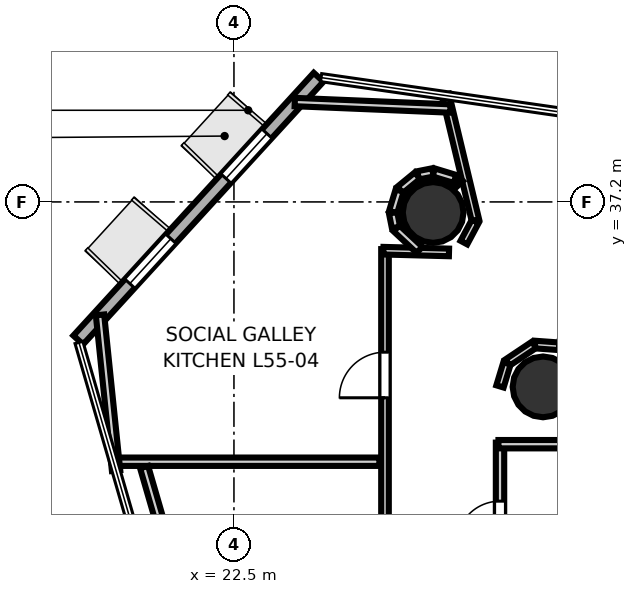
"""IFC4 building model, lengths in metres.
Left out: names, types, materials, properties, quantities, classifications, styles, units other than length and angle.
Written with IfcOpenShell. Run it as: python <this file> out.ifc"""

import sys

from ifc_helpers import new_model, si_unit, direction, frame, frame_2d, origin, origin_2d, place, context, subcontext, project, spatial, rectangle, hollow_circle, extrude, element, fill, save


model = new_model("IFC4")
c1 = context("Model", 3, precision=1e-05, world=origin(), true_north=direction((0.0, 1.0)))
c2 = subcontext(c1, "Body", "Model", "MODEL_VIEW")
j1 = project(units=[si_unit("LENGTHUNIT", "METRE"), si_unit("PLANEANGLEUNIT", "RADIAN")], contexts=[c1])
p1 = place(None, origin())
s1 = spatial("IfcSite", under=j1, at=p1, CompositionType="ELEMENT")
p2 = place(p1, origin())
s2 = spatial("IfcBuilding", under=s1, at=p2, CompositionType="ELEMENT")
p3 = place(p2, frame((0.0, 0.0, 215.1)))
s3 = spatial("IfcBuildingStorey", under=s2, at=p3, CompositionType="ELEMENT", Elevation=215.1)
for number, where, z_axis, x_axis in (
    (1, (28.6, 33.55, 0.0), (0.0, 0.0, 1.0), (1.0, 0.0, 0.0)),
    (2, (26.431, 36.992, 0.0), (0.0, 0.0, 1.0), (1.0, 0.0, 0.0)),
):
    element("IfcColumn", number, at=place(p3, frame(where, z_axis=z_axis, x_axis=x_axis)), inside=s3, PredefinedType="COLUMN", context=c2, shape_type="SweptSolid", body=[
        extrude(hollow_circle(Radius=0.6, WallThickness=0.03, at=origin_2d()), origin(), (0.0, 0.0, 1.0), 3.7),
    ])
p4 = place(p3, frame((24.17, 39.66, 0.0), z_axis=(0.0, 0.0, 1.0), x_axis=(-0.674986503916, -0.73783007497, 0.0)))
e3 = element("IfcWall", 3, at=p4, inside=s3, PredefinedType="SOLIDWALL", context=c2, shape_type="SweptSolid", body=[
    extrude(rectangle(XDim=7.028, YDim=0.26, at=frame_2d((3.514, 0.0))), origin(), (0.0, 0.0, 1.0), 3.52),
])
p5 = place(p4, frame((1.508, 0.0, 0.9)))
e4 = element("IfcOpeningElement", 4, at=p5, cuts=e3, PredefinedType="OPENING", context=c2, shape_type="SweptSolid", body=[
    extrude(rectangle(XDim=1.2, YDim=2.0, at=frame_2d((0.6, 1.0))), frame((0.0, 0.14, 0.0), z_axis=(0.0, -1.0, 0.0), x_axis=(1.0, 0.0, 0.0)), (0.0, 0.0, 1.0), 0.28),
])
p6 = place(p4, frame((4.32, 0.0, 0.9)))
e5 = element("IfcOpeningElement", 5, at=p6, cuts=e3, PredefinedType="OPENING", context=c2, shape_type="SweptSolid", body=[
    extrude(rectangle(XDim=1.2, YDim=2.0, at=frame_2d((0.6, 1.0))), frame((0.0, 0.14, 0.0), z_axis=(0.0, -1.0, 0.0), x_axis=(1.0, 0.0, 0.0)), (0.0, 0.0, 1.0), 0.28),
])
p7 = place(p3, frame((27.751, 29.28, 0.0), z_axis=(0.0, 0.0, 1.0), x_axis=(0.0, 1.0, 0.0)))
e6 = element("IfcWall", 6, at=p7, inside=s3, PredefinedType="PLUMBINGWALL", context=c2, shape_type="SweptSolid", body=[
    extrude(rectangle(XDim=3.17, YDim=0.165, at=frame_2d((1.585, 0.0))), origin(), (0.0, 0.0, 1.0), 2.84),
])
p8 = place(p7, frame((1.155, 0.0, 0.0)))
e7 = element("IfcOpeningElement", 7, at=p8, cuts=e6, PredefinedType="OPENING", context=c2, shape_type="SweptSolid", body=[
    extrude(rectangle(XDim=0.86, YDim=2.05, at=frame_2d((0.43, 1.025))), frame((0.0, 0.093, 0.0), z_axis=(0.0, -1.0, 0.0), x_axis=(1.0, 0.0, 0.0)), (0.0, 0.0, 1.0), 0.185),
])
p9 = place(p3, frame((27.72, 32.419, 0.0), z_axis=(0.0, 0.0, 1.0), x_axis=(1.0, 0.0, 0.0)))
e8 = element("IfcWall", 8, at=p9, inside=s3, PredefinedType="PLUMBINGWALL", context=c2, shape_type="SweptSolid", body=[
    extrude(rectangle(XDim=1.5, YDim=0.165, at=frame_2d((0.75, 0.0))), origin(), (0.0, 0.0, 1.0), 2.84),
])
p10 = place(p3, frame((27.265, 36.839, 0.0), z_axis=(0.0, 0.0, 1.0), x_axis=(-0.232746459293, 0.972537446933, 0.0)))
e9 = element("IfcWall", 9, at=p10, inside=s3, PredefinedType="PARTITIONING", context=c2, shape_type="SweptSolid", body=[
    extrude(rectangle(XDim=2.55, YDim=0.15, at=frame_2d((1.275, 0.0))), origin(), (0.0, 0.0, 1.0), 2.84),
])
p11 = place(p3, frame((29.64, 34.299, 0.0), z_axis=(0.0, 0.0, 1.0), x_axis=(-0.997392224386, 0.072171675429, 0.0)))
e10 = element("IfcWall", 10, at=p11, inside=s3, PredefinedType="PARTITIONING", context=c2, shape_type="SweptSolid", body=[
    extrude(rectangle(XDim=1.201, YDim=0.15, at=frame_2d((0.601, 0.0))), origin(), (0.0, 0.0, 1.0), 2.84),
])
p12 = place(p3, frame((28.423, 34.38, 0.0), z_axis=(0.0, 0.0, 1.0), x_axis=(-0.831571279003, -0.555418047903, 0.0)))
e11 = element("IfcWall", 11, at=p12, inside=s3, PredefinedType="PARTITIONING", context=c2, shape_type="SweptSolid", body=[
    extrude(rectangle(XDim=0.628, YDim=0.15, at=frame_2d((0.314, 0.0))), origin(), (0.0, 0.0, 1.0), 2.84),
])
p13 = place(p3, frame((27.888, 34.015, 0.0), z_axis=(0.0, 0.0, 1.0), x_axis=(-0.290263585829, -0.956946733492, 0.0)))
e12 = element("IfcWall", 12, at=p13, inside=s3, PredefinedType="PARTITIONING", context=c2, shape_type="SweptSolid", body=[
    extrude(rectangle(XDim=0.476, YDim=0.15, at=frame_2d((0.238, 0.0))), origin(), (0.0, 0.0, 1.0), 2.84),
])
p14 = place(p3, frame((25.481, 18.05, 0.0), z_axis=(0.0, 0.0, 1.0), x_axis=(0.0, 1.0, 0.0)))
e13 = element("IfcWall", 13, at=p14, inside=s3, PredefinedType="PARTITIONING", context=c2, shape_type="SweptSolid", body=[
    extrude(rectangle(XDim=18.219, YDim=0.15, at=frame_2d((9.109, 0.0))), origin(), (0.0, 0.0, 1.0), 2.84),
])
p15 = place(p14, frame((5.549, 0.0, 0.0)))
e14 = element("IfcOpeningElement", 14, at=p15, cuts=e13, PredefinedType="OPENING", context=c2, shape_type="SweptSolid", body=[
    extrude(rectangle(XDim=1.05, YDim=2.15, at=frame_2d((0.525, 1.075))), frame((0.0, 0.085, 0.0), z_axis=(0.0, -1.0, 0.0), x_axis=(1.0, 0.0, 0.0)), (0.0, 0.0, 1.0), 0.17),
])
p16 = place(p14, frame((15.285, 0.0, 0.0)))
e15 = element("IfcOpeningElement", 15, at=p16, cuts=e13, PredefinedType="OPENING", context=c2, shape_type="SweptSolid", body=[
    extrude(rectangle(XDim=0.9, YDim=2.1, at=frame_2d((0.45, 1.05))), frame((0.0, 0.085, 0.0), z_axis=(0.0, -1.0, 0.0), x_axis=(1.0, 0.0, 0.0)), (0.0, 0.0, 1.0), 0.17),
])
p17 = place(p14, frame((10.15, 0.0, 0.0)))
e16 = element("IfcOpeningElement", 16, at=p17, cuts=e13, PredefinedType="OPENING", context=c2, shape_type="SweptSolid", body=[
    extrude(rectangle(XDim=0.9, YDim=2.1, at=frame_2d((0.45, 1.05))), frame((0.0, 0.085, 0.0), z_axis=(0.0, -1.0, 0.0), x_axis=(1.0, 0.0, 0.0)), (0.0, 0.0, 1.0), 0.17),
])
p18 = place(p3, frame((25.449, 36.238, 0.0), z_axis=(0.0, 0.0, 1.0), x_axis=(0.999651698073, -0.026390955635, 0.0)))
e17 = element("IfcWall", 17, at=p18, inside=s3, PredefinedType="PARTITIONING", context=c2, shape_type="SweptSolid", body=[
    extrude(rectangle(XDim=1.295, YDim=0.15, at=frame_2d((0.647, 0.0))), origin(), (0.0, 0.0, 1.0), 2.84),
])
p19 = place(p3, frame((27.038, 36.398, 0.0), z_axis=(0.0, 0.0, 1.0), x_axis=(0.471865548338, 0.881670519123, 0.0)))
e18 = element("IfcWall", 18, at=p19, inside=s3, PredefinedType="PARTITIONING", context=c2, shape_type="SweptSolid", body=[
    extrude(rectangle(XDim=0.476, YDim=0.15, at=frame_2d((0.238, 0.0))), origin(), (0.0, 0.0, 1.0), 2.84),
])
p20 = place(p3, frame((26.958, 37.556, 0.0), z_axis=(0.0, 0.0, 1.0), x_axis=(-0.679287079355, 0.733872648231, 0.0)))
e19 = element("IfcWall", 19, at=p20, inside=s3, PredefinedType="PLUMBINGWALL", context=c2, shape_type="SweptSolid", body=[
    extrude(rectangle(XDim=0.121, YDim=0.165, at=frame_2d((0.061, 0.0))), origin(), (0.0, 0.0, 1.0), 2.84),
])
p21 = place(p3, frame((26.862, 37.654, 0.0), z_axis=(0.0, 0.0, 1.0), x_axis=(-0.9569080268, 0.290391164202, 0.0)))
e20 = element("IfcWall", 20, at=p21, inside=s3, PredefinedType="PLUMBINGWALL", context=c2, shape_type="SweptSolid", body=[
    extrude(rectangle(XDim=0.441, YDim=0.165, at=frame_2d((0.221, 0.0))), origin(), (0.0, 0.0, 1.0), 2.84),
])
p22 = place(p3, frame((26.425, 37.782, 0.0), z_axis=(0.0, 0.0, 1.0), x_axis=(-0.980801578599, -0.195008367557, 0.0)))
e21 = element("IfcWall", 21, at=p22, inside=s3, PredefinedType="PLUMBINGWALL", context=c2, shape_type="SweptSolid", body=[
    extrude(rectangle(XDim=0.297, YDim=0.165, at=frame_2d((0.148, 0.0))), origin(), (0.0, 0.0, 1.0), 2.84),
])
p23 = place(p3, frame((26.121, 37.718, 0.0), z_axis=(0.0, 0.0, 1.0), x_axis=(-0.773365427174, -0.633960500387, 0.0)))
e22 = element("IfcWall", 22, at=p23, inside=s3, PredefinedType="PLUMBINGWALL", context=c2, shape_type="SweptSolid", body=[
    extrude(rectangle(XDim=0.441, YDim=0.165, at=frame_2d((0.221, 0.0))), origin(), (0.0, 0.0, 1.0), 2.84),
])
p24 = place(p3, frame((25.769, 37.423, 0.0), z_axis=(0.0, 0.0, 1.0), x_axis=(-0.290038119708, -0.957015093463, 0.0)))
e23 = element("IfcWall", 23, at=p24, inside=s3, PredefinedType="PLUMBINGWALL", context=c2, shape_type="SweptSolid", body=[
    extrude(rectangle(XDim=0.441, YDim=0.165, at=frame_2d((0.221, 0.0))), origin(), (0.0, 0.0, 1.0), 2.84),
])
p25 = place(p3, frame((25.641, 36.986, 0.0), z_axis=(0.0, 0.0, 1.0), x_axis=(0.195008367557, -0.980801578599, 0.0)))
e24 = element("IfcWall", 24, at=p25, inside=s3, PredefinedType="PLUMBINGWALL", context=c2, shape_type="SweptSolid", body=[
    extrude(rectangle(XDim=0.297, YDim=0.165, at=frame_2d((0.148, 0.0))), origin(), (0.0, 0.0, 1.0), 2.84),
])
p26 = place(p3, frame((25.708, 36.678, 0.0), z_axis=(0.0, 0.0, 1.0), x_axis=(0.730846282416, -0.682542095023, 0.0)))
e25 = element("IfcWall", 25, at=p26, inside=s3, PredefinedType="PLUMBINGWALL", context=c2, shape_type="SweptSolid", body=[
    extrude(rectangle(XDim=0.622, YDim=0.165, at=frame_2d((0.311, 0.0))), origin(), (0.0, 0.0, 1.0), 2.84),
])
p27 = place(p3, frame((25.37, 32.073, 0.0), z_axis=(0.0, 0.0, 1.0), x_axis=(-1.0, 0.0, 0.0)))
e26 = element("IfcWall", 26, at=p27, inside=s3, PredefinedType="PLUMBINGWALL", context=c2, shape_type="SweptSolid", body=[
    extrude(rectangle(XDim=5.267, YDim=0.165, at=frame_2d((2.634, 0.0))), origin(), (0.0, 0.0, 1.0), 2.84),
])
p28 = place(p3, frame((20.174, 31.897, 0.0), z_axis=(0.0, 0.0, 1.0), x_axis=(-0.102570229054, 0.99472576528, 0.0)))
e27 = element("IfcWall", 27, at=p28, inside=s3, PredefinedType="PLUMBINGWALL", context=c2, shape_type="SweptSolid", body=[
    extrude(rectangle(XDim=3.09, YDim=0.165, at=frame_2d((1.545, 0.0))), origin(), (0.0, 0.0, 1.0), 2.84),
])
p29 = place(p3, frame((23.701, 39.171, 0.0), z_axis=(0.0, 0.0, 1.0), x_axis=(0.999133486017, -0.041620633331, 0.0)))
e28 = element("IfcWall", 28, at=p29, inside=s3, PredefinedType="PLUMBINGWALL", context=c2, shape_type="SweptSolid", body=[
    extrude(rectangle(XDim=3.074, YDim=0.165, at=frame_2d((1.537, 0.0))), origin(), (0.0, 0.0, 1.0), 2.84),
])
p30 = place(p3, frame((22.644, 25.351, 0.0), z_axis=(0.0, 0.0, 1.0), x_axis=(-0.278305064514, 0.960492733479, 0.0)))
e29 = element("IfcWall", 29, at=p30, inside=s3, PredefinedType="PLUMBINGWALL", context=c2, shape_type="SweptSolid", body=[
    extrude(rectangle(XDim=6.888, YDim=0.165, at=frame_2d((3.444, 0.0))), origin(), (0.0, 0.0, 1.0), 2.84),
])
p31 = place(p8, origin())
e30 = element("IfcDoor", 30, at=p31, inside=s3, OperationType="SINGLE_SWING_LEFT", PredefinedType="DOOR", context=c2, shape_type="SweptSolid", body=[
    extrude(rectangle(XDim=0.86, YDim=2.05, at=frame_2d((0.43, 1.025))), frame((0.0, 0.025, 0.0), z_axis=(0.0, -1.0, 0.0), x_axis=(1.0, 0.0, 0.0)), (0.0, 0.0, 1.0), 0.05),
])
fill(e7, e30)
p32 = place(p16, origin())
e31 = element("IfcDoor", 31, at=p32, inside=s3, OperationType="SINGLE_SWING_LEFT", PredefinedType="DOOR", context=c2, shape_type="SweptSolid", body=[
    extrude(rectangle(XDim=0.9, YDim=2.1, at=frame_2d((0.45, 1.05))), frame((0.0, 0.025, 0.0), z_axis=(0.0, -1.0, 0.0), x_axis=(1.0, 0.0, 0.0)), (0.0, 0.0, 1.0), 0.05),
])
fill(e15, e31)
p33 = place(p5, origin())
e32 = element("IfcWindow", 32, at=p33, inside=s3, PartitioningType="SINGLE_PANEL", PredefinedType="WINDOW", context=c2, shape_type="SweptSolid", body=[
    extrude(rectangle(XDim=1.2, YDim=2.0, at=frame_2d((0.6, 1.0))), frame((0.0, 0.03, 0.0), z_axis=(0.0, -1.0, 0.0), x_axis=(1.0, 0.0, 0.0)), (0.0, 0.0, 1.0), 0.06),
])
fill(e4, e32)
p34 = place(p6, origin())
e33 = element("IfcWindow", 33, at=p34, inside=s3, PartitioningType="SINGLE_PANEL", PredefinedType="WINDOW", context=c2, shape_type="SweptSolid", body=[
    extrude(rectangle(XDim=1.2, YDim=2.0, at=frame_2d((0.6, 1.0))), frame((0.0, 0.03, 0.0), z_axis=(0.0, -1.0, 0.0), x_axis=(1.0, 0.0, 0.0)), (0.0, 0.0, 1.0), 0.06),
])
fill(e5, e33)
save(model, sys.argv[1])
